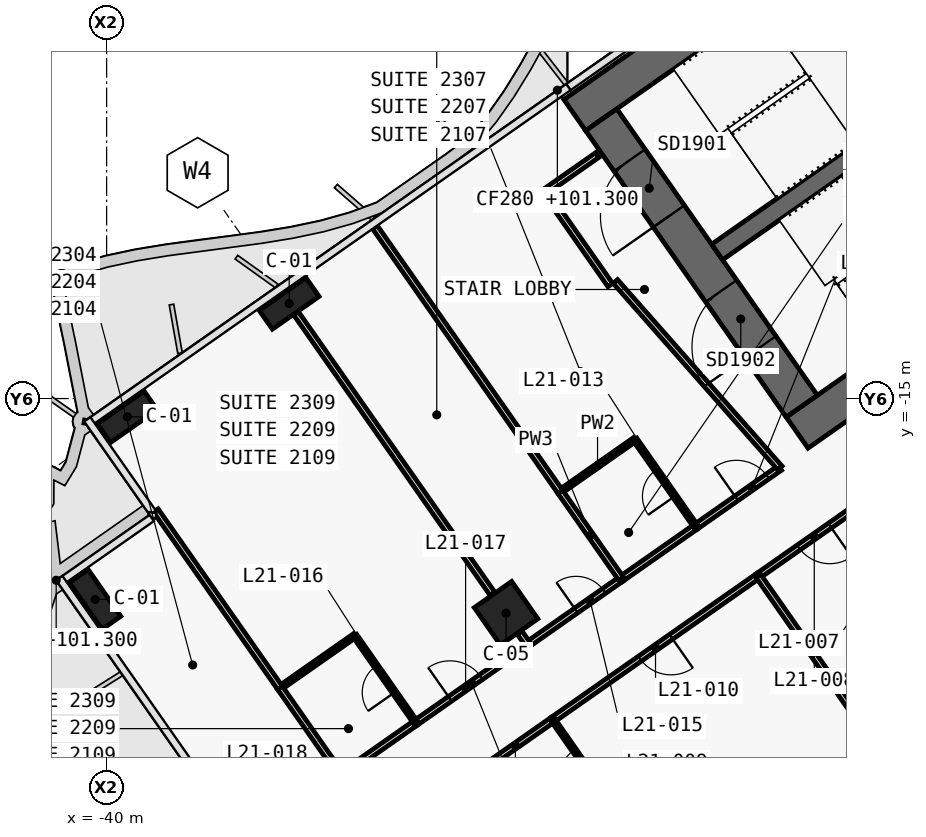
"""IFC4 building model, lengths in metres.
Left out: names, types, materials, properties, quantities, classifications, styles, units other than length and angle.
Written with IfcOpenShell. Run it as: python <this file> out.ifc"""

import sys

from ifc_helpers import new_model, si_unit, direction, frame, frame_2d, origin, origin_2d, place, context, subcontext, project, spatial, polyline, rectangle, outline, extrude, element, fill, save


model = new_model("IFC4")
c1 = context("Model", 3, precision=1e-05, world=origin(), true_north=direction((0.0, 1.0)))
c2 = subcontext(c1, "Body", "Model", "MODEL_VIEW")
j1 = project(units=[si_unit("LENGTHUNIT", "METRE"), si_unit("PLANEANGLEUNIT", "RADIAN")], contexts=[c1])
p1 = place(None, origin())
s1 = spatial("IfcSite", under=j1, at=p1, CompositionType="ELEMENT")
p2 = place(p1, origin())
s2 = spatial("IfcBuilding", under=s1, at=p2, CompositionType="ELEMENT")
p3 = place(p2, frame((0.0, 0.0, 101.3)))
s3 = spatial("IfcBuildingStorey", under=s2, at=p3, CompositionType="ELEMENT", Elevation=101.3)
p4 = place(p3, frame((0.037, 11.867, 0.0), z_axis=(0.0, 0.0, 1.0), x_axis=(-0.819155306259, -0.573571777746, 0.0)))
e1 = element("IfcWall", 1, at=p4, inside=s3, PredefinedType="SHEAR", context=c2, shape_type="SweptSolid", body=[
    extrude(outline(polyline([(33.837, 0.5), (0.7, 0.5), (0.0, -0.5), (33.837, -0.5), (33.837, 0.5)])), origin(), (0.0, 0.0, 1.0), 3.6),
])
p5 = place(p3, frame((0.037, -0.585, 0.0), z_axis=(0.0, 0.0, 1.0), x_axis=(-0.819157152511, -0.573569140985, 0.0)))
e2 = element("IfcWall", 2, at=p5, inside=s3, PredefinedType="SHEAR", context=c2, shape_type="SweptSolid", body=[
    extrude(outline(polyline([(26.695, 0.5), (0.7, 0.5), (0.0, -0.5), (26.695, -0.5), (26.695, 0.5)])), origin(), (0.0, 0.0, 1.0), 3.6),
])
p6 = place(p5, frame((2.995, 0.0, 0.0)))
e3 = element("IfcOpeningElement", 3, at=p6, cuts=e2, PredefinedType="OPENING", context=c2, shape_type="SweptSolid", body=[
    extrude(rectangle(XDim=2.4, YDim=2.1, at=frame_2d((1.2, 1.05))), frame((0.0, 0.51, 0.0), z_axis=(0.0, -1.0, 0.0), x_axis=(1.0, 0.0, 0.0)), (0.0, 0.0, 1.0), 1.02),
])
p7 = place(p5, frame((11.995, 0.0, 0.0)))
e4 = element("IfcOpeningElement", 4, at=p7, cuts=e2, PredefinedType="OPENING", context=c2, shape_type="SweptSolid", body=[
    extrude(rectangle(XDim=2.4, YDim=2.1, at=frame_2d((1.2, 1.05))), frame((0.0, 0.51, 0.0), z_axis=(0.0, -1.0, 0.0), x_axis=(1.0, 0.0, 0.0)), (0.0, 0.0, 1.0), 1.02),
])
p8 = place(p3, frame((-21.708, -15.2, 0.0), z_axis=(0.0, 0.0, 1.0), x_axis=(-0.573576324356, 0.819152122709, 0.0)))
e5 = element("IfcWall", 5, at=p8, inside=s3, PredefinedType="SHEAR", context=c2, shape_type="SweptSolid", body=[
    extrude(outline(polyline([(0.0, 0.5), (0.0, -0.5), (9.2, -0.5), (9.2, 0.5), (0.0, 0.5)])), origin(), (0.0, 0.0, 1.0), 3.6),
])
p9 = place(p8, frame((6.1, 0.0, 0.0)))
e6 = element("IfcOpeningElement", 6, at=p9, cuts=e5, PredefinedType="OPENING", context=c2, shape_type="SweptSolid", body=[
    extrude(rectangle(XDim=1.8, YDim=2.1, at=frame_2d((0.9, 1.05))), frame((0.0, 0.51, 0.0), z_axis=(0.0, -1.0, 0.0), x_axis=(1.0, 0.0, 0.0)), (0.0, 0.0, 1.0), 1.02),
])
p10 = place(p8, frame((1.9, 0.0, 0.0)))
e7 = element("IfcOpeningElement", 7, at=p10, cuts=e5, PredefinedType="OPENING", context=c2, shape_type="SweptSolid", body=[
    extrude(rectangle(XDim=1.8, YDim=2.1, at=frame_2d((0.9, 1.05))), frame((0.0, 0.51, 0.0), z_axis=(0.0, -1.0, 0.0), x_axis=(1.0, 0.0, 0.0)), (0.0, 0.0, 1.0), 1.02),
])
p11 = place(p3, frame((-2.638, 3.768, 0.0), z_axis=(0.0, 0.0, 1.0), x_axis=(-0.819148977158, -0.573580816643, 0.0)))
e8 = element("IfcWall", 8, at=p11, inside=s3, PredefinedType="SHEAR", context=c2, shape_type="SweptSolid", body=[
    extrude(outline(polyline([(26.0, 0.25), (0.0, 0.25), (0.0, -0.25), (26.0, -0.25), (26.0, 0.25)])), origin(), (0.0, 0.0, 1.0), 3.6),
])
p12 = place(p11, frame((1.169, 0.0, 0.0)))
e9 = element("IfcOpeningElement", 9, at=p12, cuts=e8, PredefinedType="OPENING", context=c2, shape_type="SweptSolid", body=[
    extrude(rectangle(XDim=1.1, YDim=2.1, at=frame_2d((0.55, 1.05))), frame((0.0, 0.26, 0.0), z_axis=(0.0, -1.0, 0.0), x_axis=(1.0, 0.0, 0.0)), (0.0, 0.0, 1.0), 0.52),
])
p13 = place(p11, frame((3.206, 0.0, 0.0)))
e10 = element("IfcOpeningElement", 10, at=p13, cuts=e8, PredefinedType="OPENING", context=c2, shape_type="SweptSolid", body=[
    extrude(rectangle(XDim=1.1, YDim=2.1, at=frame_2d((0.55, 1.05))), frame((0.0, 0.26, 0.0), z_axis=(0.0, -1.0, 0.0), x_axis=(1.0, 0.0, 0.0)), (0.0, 0.0, 1.0), 0.52),
])
p14 = place(p11, frame((5.244, 0.0, 0.0)))
e11 = element("IfcOpeningElement", 11, at=p14, cuts=e8, PredefinedType="OPENING", context=c2, shape_type="SweptSolid", body=[
    extrude(rectangle(XDim=1.1, YDim=2.1, at=frame_2d((0.55, 1.05))), frame((0.0, 0.26, 0.0), z_axis=(0.0, -1.0, 0.0), x_axis=(1.0, 0.0, 0.0)), (0.0, 0.0, 1.0), 0.52),
])
p15 = place(p11, frame((7.281, 0.0, 0.0)))
e12 = element("IfcOpeningElement", 12, at=p15, cuts=e8, PredefinedType="OPENING", context=c2, shape_type="SweptSolid", body=[
    extrude(rectangle(XDim=1.1, YDim=2.1, at=frame_2d((0.55, 1.05))), frame((0.0, 0.26, 0.0), z_axis=(0.0, -1.0, 0.0), x_axis=(1.0, 0.0, 0.0)), (0.0, 0.0, 1.0), 0.52),
])
p16 = place(p11, frame((9.688, 0.0, 0.0)))
e13 = element("IfcOpeningElement", 13, at=p16, cuts=e8, PredefinedType="OPENING", context=c2, shape_type="SweptSolid", body=[
    extrude(rectangle(XDim=1.1, YDim=2.1, at=frame_2d((0.55, 1.05))), frame((0.0, 0.26, 0.0), z_axis=(0.0, -1.0, 0.0), x_axis=(1.0, 0.0, 0.0)), (0.0, 0.0, 1.0), 0.52),
])
p17 = place(p11, frame((11.863, 0.0, 0.0)))
e14 = element("IfcOpeningElement", 14, at=p17, cuts=e8, PredefinedType="OPENING", context=c2, shape_type="SweptSolid", body=[
    extrude(rectangle(XDim=1.1, YDim=2.1, at=frame_2d((0.55, 1.05))), frame((0.0, 0.26, 0.0), z_axis=(0.0, -1.0, 0.0), x_axis=(1.0, 0.0, 0.0)), (0.0, 0.0, 1.0), 0.52),
])
p18 = place(p11, frame((14.038, 0.0, 0.0)))
e15 = element("IfcOpeningElement", 15, at=p18, cuts=e8, PredefinedType="OPENING", context=c2, shape_type="SweptSolid", body=[
    extrude(rectangle(XDim=1.1, YDim=2.1, at=frame_2d((0.55, 1.05))), frame((0.0, 0.26, 0.0), z_axis=(0.0, -1.0, 0.0), x_axis=(1.0, 0.0, 0.0)), (0.0, 0.0, 1.0), 0.52),
])
p19 = place(p11, frame((16.212, 0.0, 0.0)))
e16 = element("IfcOpeningElement", 16, at=p19, cuts=e8, PredefinedType="OPENING", context=c2, shape_type="SweptSolid", body=[
    extrude(rectangle(XDim=1.1, YDim=2.1, at=frame_2d((0.55, 1.05))), frame((0.0, 0.26, 0.0), z_axis=(0.0, -1.0, 0.0), x_axis=(1.0, 0.0, 0.0)), (0.0, 0.0, 1.0), 0.52),
])
for number, where, z_axis, x_axis in (
    (17, (-35.197, -12.498, 0.0), (0.0, 0.0, 1.0), (-0.819, -0.574, 0.0)),
    (18, (-39.456, -15.481, 0.0), (0.0, 0.0, 1.0), (-0.819, -0.574, 0.0)),
    (19, (-40.303, -20.286, 0.0), (0.0, 0.0, 1.0), (-0.574, 0.819, 0.0)),
):
    element("IfcColumn", number, at=place(p3, frame(where, z_axis=z_axis, x_axis=x_axis)), inside=s3, PredefinedType="COLUMN", context=c2, shape_type="SweptSolid", body=[
        extrude(rectangle(XDim=1.5, YDim=0.6, at=origin_2d()), origin(), (0.0, 0.0, 1.0), 3.6),
    ])
p20 = place(p3, frame((-29.49, -20.649, 0.0), z_axis=(0.0, 0.0, 1.0), x_axis=(-0.819152044289, -0.573576436351, 0.0)))
e20 = element("IfcColumn", 20, at=p20, inside=s3, PredefinedType="COLUMN", context=c2, shape_type="SweptSolid", body=[
    extrude(rectangle(XDim=1.2, YDim=1.2, at=origin_2d()), origin(), (0.0, 0.0, 1.0), 3.6),
])
p21 = place(p3, frame((-24.493, -18.371, 0.0), z_axis=(0.0, 0.0, 1.0), x_axis=(0.819176640776, 0.573541307325, 0.0)))
e21 = element("IfcWall", 21, at=p21, inside=s3, PredefinedType="PARTITIONING", context=c2, shape_type="SweptSolid", body=[
    extrude(rectangle(XDim=2.698, YDim=0.15, at=frame_2d((1.349, 0.0))), origin(), (0.0, 0.0, 1.0), 3.32),
])
p22 = place(p21, frame((1.301, 0.0, 0.0)))
e22 = element("IfcOpeningElement", 22, at=p22, cuts=e21, PredefinedType="OPENING", context=c2, shape_type="SweptSolid", body=[
    extrude(rectangle(XDim=1.0, YDim=2.1, at=frame_2d((0.5, 1.05))), frame((0.0, 0.085, 0.0), z_axis=(0.0, -1.0, 0.0), x_axis=(1.0, 0.0, 0.0)), (0.0, 0.0, 1.0), 0.17),
])
p23 = place(p3, frame((-26.46, -19.748, 0.0), z_axis=(0.0, 0.0, 1.0), x_axis=(0.819179439794, 0.573537309527, 0.0)))
e23 = element("IfcWall", 23, at=p23, inside=s3, PredefinedType="PARTITIONING", context=c2, shape_type="SweptSolid", body=[
    extrude(rectangle(XDim=2.404, YDim=0.15, at=frame_2d((1.202, 0.0))), origin(), (0.0, 0.0, 1.0), 3.32),
])
p24 = place(p3, frame((-28.917, -21.469, 0.0), z_axis=(0.0, 0.0, 1.0), x_axis=(0.81916700466, 0.573555070134, 0.0)))
e24 = element("IfcWall", 24, at=p24, inside=s3, PredefinedType="PARTITIONING", context=c2, shape_type="SweptSolid", body=[
    extrude(rectangle(XDim=3.004, YDim=0.15, at=frame_2d((1.502, 0.0))), origin(), (0.0, 0.0, 1.0), 2.6),
])
p25 = place(p24, frame((1.552, 0.0, 0.0)))
e25 = element("IfcOpeningElement", 25, at=p25, cuts=e24, PredefinedType="OPENING", context=c2, shape_type="SweptSolid", body=[
    extrude(rectangle(XDim=0.9, YDim=2.1, at=frame_2d((0.45, 1.05))), frame((0.0, 0.085, 0.0), z_axis=(0.0, -1.0, 0.0), x_axis=(1.0, 0.0, 0.0)), (0.0, 0.0, 1.0), 0.17),
])
p26 = place(p3, frame((-31.866, -23.533, 0.0), z_axis=(0.0, 0.0, 1.0), x_axis=(0.819145961204, 0.573585123798, 0.0)))
e26 = element("IfcWall", 26, at=p26, inside=s3, PredefinedType="PARTITIONING", context=c2, shape_type="SweptSolid", body=[
    extrude(rectangle(XDim=3.603, YDim=0.15, at=frame_2d((1.802, 0.0))), origin(), (0.0, 0.0, 1.0), 2.6),
])
p27 = place(p26, frame((1.101, 0.0, 0.0)))
e27 = element("IfcOpeningElement", 27, at=p27, cuts=e26, PredefinedType="OPENING", context=c2, shape_type="SweptSolid", body=[
    extrude(rectangle(XDim=1.0, YDim=2.1, at=frame_2d((0.5, 1.05))), frame((0.0, 0.085, 0.0), z_axis=(0.0, -1.0, 0.0), x_axis=(1.0, 0.0, 0.0)), (0.0, 0.0, 1.0), 0.17),
])
p28 = place(p3, frame((-33.833, -24.91, 0.0), z_axis=(0.0, 0.0, 1.0), x_axis=(0.819146032251, 0.573585022335, 0.0)))
e28 = element("IfcWall", 28, at=p28, inside=s3, PredefinedType="PARTITIONING", context=c2, shape_type="SweptSolid", body=[
    extrude(rectangle(XDim=2.404, YDim=0.15, at=frame_2d((1.202, 0.0))), origin(), (0.0, 0.0, 1.0), 3.32),
])
p29 = place(p3, frame((-19.904, -17.599, 0.0), z_axis=(0.0, 0.0, 1.0), x_axis=(-0.819145961204, -0.573585123798, 0.0)))
e29 = element("IfcWall", 29, at=p29, inside=s3, PredefinedType="PARTITIONING", context=c2, shape_type="SweptSolid", body=[
    extrude(rectangle(XDim=3.603, YDim=0.15, at=frame_2d((1.802, 0.0))), origin(), (0.0, 0.0, 1.0), 2.6),
])
p30 = place(p29, frame((1.301, 0.0, 0.0)))
e30 = element("IfcOpeningElement", 30, at=p30, cuts=e29, PredefinedType="OPENING", context=c2, shape_type="SweptSolid", body=[
    extrude(rectangle(XDim=1.0, YDim=2.1, at=frame_2d((0.5, 1.05))), frame((0.0, 0.085, 0.0), z_axis=(0.0, -1.0, 0.0), x_axis=(1.0, 0.0, 0.0)), (0.0, 0.0, 1.0), 0.17),
])
p31 = place(p3, frame((-22.852, -19.664, 0.0), z_axis=(0.0, 0.0, 1.0), x_axis=(-0.819141582452, -0.573591377113, 0.0)))
e31 = element("IfcWall", 31, at=p31, inside=s3, PredefinedType="PARTITIONING", context=c2, shape_type="SweptSolid", body=[
    extrude(rectangle(XDim=6.603, YDim=0.15, at=frame_2d((3.301, 0.0))), origin(), (0.0, 0.0, 1.0), 2.6),
])
p32 = place(p31, frame((2.802, 0.0, 0.0)))
e32 = element("IfcOpeningElement", 32, at=p32, cuts=e31, PredefinedType="OPENING", context=c2, shape_type="SweptSolid", body=[
    extrude(rectangle(XDim=1.0, YDim=2.1, at=frame_2d((0.5, 1.05))), frame((0.0, 0.085, 0.0), z_axis=(0.0, -1.0, 0.0), x_axis=(1.0, 0.0, 0.0)), (0.0, 0.0, 1.0), 0.17),
])
p33 = place(p3, frame((-28.259, -23.449, 0.0), z_axis=(0.0, 0.0, 1.0), x_axis=(-0.819146032251, -0.573585022335, 0.0)))
e33 = element("IfcWall", 33, at=p33, inside=s3, PredefinedType="PARTITIONING", context=c2, shape_type="SweptSolid", body=[
    extrude(rectangle(XDim=2.404, YDim=0.15, at=frame_2d((1.202, 0.0))), origin(), (0.0, 0.0, 1.0), 3.32),
])
p34 = place(p3, frame((-26.746, -12.014, 0.0), z_axis=(0.0, 0.0, 1.0), x_axis=(-0.573560650686, 0.819163097304, 0.0)))
e34 = element("IfcWall", 34, at=p34, inside=s3, PredefinedType="PARTITIONING", context=c2, shape_type="SweptSolid", body=[
    extrude(rectangle(XDim=3.0, YDim=0.15, at=frame_2d((1.5, 0.0))), origin(), (0.0, 0.0, 1.0), 3.32),
])
p35 = place(p3, frame((-28.467, -9.556, 0.0), z_axis=(0.0, 0.0, 1.0), x_axis=(0.819109000826, 0.573637903879, 0.0)))
e35 = element("IfcWall", 35, at=p35, inside=s3, PredefinedType="PARTITIONING", context=c2, shape_type="SweptSolid", body=[
    extrude(rectangle(XDim=1.68, YDim=0.15, at=frame_2d((0.84, 0.0))), origin(), (0.0, 0.0, 1.0), 3.32),
])
p36 = place(p3, frame((-22.284, -16.827, 0.0), z_axis=(0.0, 0.0, 1.0), x_axis=(-0.661545117561, 0.749905365651, 0.0)))
e36 = element("IfcWall", 36, at=p36, inside=s3, PredefinedType="PARTITIONING", context=c2, shape_type="SweptSolid", body=[
    extrude(rectangle(XDim=6.543, YDim=0.15, at=frame_2d((3.271, 0.0))), origin(), (0.0, 0.0, 1.0), 2.6),
])
p37 = place(p3, frame((-26.099, -16.076, 0.0), z_axis=(0.0, 0.0, 1.0), x_axis=(-0.819155442668, -0.573571582932, 0.0)))
e37 = element("IfcWall", 37, at=p37, inside=s3, PredefinedType="PARTITIONING", context=c2, shape_type="SweptSolid", body=[
    extrude(rectangle(XDim=2.4, YDim=0.12, at=frame_2d((1.2, 0.0))), origin(), (0.0, 0.0, 1.0), 3.32),
])
p38 = place(p3, frame((-24.492, -18.37, 0.0), z_axis=(0.0, 0.0, 1.0), x_axis=(-0.573550118428, 0.819170471667, 0.0)))
e38 = element("IfcWall", 38, at=p38, inside=s3, PredefinedType="PARTITIONING", context=c2, shape_type="SweptSolid", body=[
    extrude(rectangle(XDim=2.8, YDim=0.12, at=frame_2d((1.4, 0.0))), origin(), (0.0, 0.0, 1.0), 2.6),
])
p39 = place(p38, frame((0.975, 0.0, 0.0)))
e39 = element("IfcOpeningElement", 39, at=p39, cuts=e38, PredefinedType="OPENING", context=c2, shape_type="SweptSolid", body=[
    extrude(rectangle(XDim=0.85, YDim=2.05, at=frame_2d((0.425, 1.025))), frame((0.0, 0.07, 0.0), z_axis=(0.0, -1.0, 0.0), x_axis=(1.0, 0.0, 0.0)), (0.0, 0.0, 1.0), 0.14),
])
p40 = place(p3, frame((-28.065, -17.453, 0.0), z_axis=(0.0, 0.0, 1.0), x_axis=(-0.573593433868, 0.819140142237, 0.0)))
e40 = element("IfcWall", 40, at=p40, inside=s3, PredefinedType="PARTITIONING", context=c2, shape_type="SweptSolid", body=[
    extrude(rectangle(XDim=8.499, YDim=0.15, at=frame_2d((4.25, 0.0))), origin(), (0.0, 0.0, 1.0), 2.6),
])
p41 = place(p3, frame((-26.458, -19.747, 0.0), z_axis=(0.0, 0.0, 1.0), x_axis=(-0.573550118428, 0.819170471667, 0.0)))
e41 = element("IfcWall", 41, at=p41, inside=s3, PredefinedType="PARTITIONING", context=c2, shape_type="SweptSolid", body=[
    extrude(rectangle(XDim=2.8, YDim=0.15, at=frame_2d((1.4, 0.0))), origin(), (0.0, 0.0, 1.0), 2.6),
])
p42 = place(p3, frame((-28.916, -21.468, 0.0), z_axis=(0.0, 0.0, 1.0), x_axis=(-0.572944929411, 0.819593867633, 0.0)))
e42 = element("IfcWall", 42, at=p42, inside=s3, PredefinedType="PARTITIONING", context=c2, shape_type="SweptSolid", body=[
    extrude(rectangle(XDim=0.38, YDim=0.15, at=frame_2d((0.19, 0.0))), origin(), (0.0, 0.0, 1.0), 2.6),
])
p43 = place(p3, frame((-29.845, -20.141, 0.0), z_axis=(0.0, 0.0, 1.0), x_axis=(-0.573558725113, 0.819164445546, 0.0)))
e43 = element("IfcWall", 43, at=p43, inside=s3, PredefinedType="PARTITIONING", context=c2, shape_type="SweptSolid", body=[
    extrude(rectangle(XDim=9.01, YDim=0.15, at=frame_2d((4.505, 0.0))), origin(), (0.0, 0.0, 1.0), 2.6),
])
p44 = place(p3, frame((-31.864, -23.532, 0.0), z_axis=(0.0, 0.0, 1.0), x_axis=(-0.573550118428, 0.819170471667, 0.0)))
e44 = element("IfcWall", 44, at=p44, inside=s3, PredefinedType="PARTITIONING", context=c2, shape_type="SweptSolid", body=[
    extrude(rectangle(XDim=2.8, YDim=0.12, at=frame_2d((1.4, 0.0))), origin(), (0.0, 0.0, 1.0), 2.6),
])
p45 = place(p44, frame((0.975, 0.0, 0.0)))
e45 = element("IfcOpeningElement", 45, at=p45, cuts=e44, PredefinedType="OPENING", context=c2, shape_type="SweptSolid", body=[
    extrude(rectangle(XDim=0.85, YDim=2.05, at=frame_2d((0.425, 1.025))), frame((0.0, 0.07, 0.0), z_axis=(0.0, -1.0, 0.0), x_axis=(1.0, 0.0, 0.0)), (0.0, 0.0, 1.0), 0.14),
])
p46 = place(p3, frame((-33.471, -21.238, 0.0), z_axis=(0.0, 0.0, 1.0), x_axis=(-0.819141114317, -0.573592045652, 0.0)))
e46 = element("IfcWall", 46, at=p46, inside=s3, PredefinedType="PARTITIONING", context=c2, shape_type="SweptSolid", body=[
    extrude(rectangle(XDim=2.4, YDim=0.12, at=frame_2d((1.2, 0.0))), origin(), (0.0, 0.0, 1.0), 3.32),
])
p47 = place(p3, frame((-35.438, -22.615, 0.0), z_axis=(0.0, 0.0, 1.0), x_axis=(-0.573568678046, 0.819157476658, 0.0)))
e47 = element("IfcWall", 47, at=p47, inside=s3, PredefinedType="PARTITIONING", context=c2, shape_type="SweptSolid", body=[
    extrude(rectangle(XDim=5.701, YDim=0.15, at=frame_2d((2.851, 0.0))), origin(), (0.0, 0.0, 1.0), 3.32),
])
p48 = place(p3, frame((-33.831, -24.909, 0.0), z_axis=(0.0, 0.0, 1.0), x_axis=(-0.573550118428, 0.819170471667, 0.0)))
e48 = element("IfcWall", 48, at=p48, inside=s3, PredefinedType="PARTITIONING", context=c2, shape_type="SweptSolid", body=[
    extrude(rectangle(XDim=2.8, YDim=0.15, at=frame_2d((1.4, 0.0))), origin(), (0.0, 0.0, 1.0), 2.6),
])
p49 = place(p3, frame((-18.667, -25.645, 0.0), z_axis=(0.0, 0.0, 1.0), x_axis=(-0.573572324301, 0.819154923562, 0.0)))
e49 = element("IfcWall", 49, at=p49, inside=s3, PredefinedType="PARTITIONING", context=c2, shape_type="SweptSolid", body=[
    extrude(rectangle(XDim=7.3, YDim=0.15, at=frame_2d((3.65, 0.0))), origin(), (0.0, 0.0, 1.0), 2.5),
])
p50 = place(p3, frame((-26.653, -25.743, 0.0), z_axis=(0.0, 0.0, 1.0), x_axis=(-0.573608623498, 0.819129505664, 0.0)))
e50 = element("IfcWall", 50, at=p50, inside=s3, PredefinedType="PARTITIONING", context=c2, shape_type="SweptSolid", body=[
    extrude(rectangle(XDim=2.8, YDim=0.12, at=frame_2d((1.4, 0.0))), origin(), (0.0, 0.0, 1.0), 3.32),
])
p51 = place(p50, frame((0.975, 0.0, 0.0)))
e51 = element("IfcOpeningElement", 51, at=p51, cuts=e50, PredefinedType="OPENING", context=c2, shape_type="SweptSolid", body=[
    extrude(rectangle(XDim=0.85, YDim=2.05, at=frame_2d((0.425, 1.025))), frame((0.0, 0.07, 0.0), z_axis=(0.0, -1.0, 0.0), x_axis=(1.0, 0.0, 0.0)), (0.0, 0.0, 1.0), 0.14),
])
p52 = place(p9, origin())
e52 = element("IfcDoor", 52, at=p52, inside=s3, OperationType="DOUBLE_DOOR_SINGLE_SWING", PredefinedType="DOOR", context=c2, shape_type="SweptSolid", body=[
    extrude(rectangle(XDim=1.8, YDim=2.1, at=frame_2d((0.9, 1.05))), frame((0.0, 0.025, 0.0), z_axis=(0.0, -1.0, 0.0), x_axis=(1.0, 0.0, 0.0)), (0.0, 0.0, 1.0), 0.05),
])
fill(e6, e52)
p53 = place(p10, origin())
e53 = element("IfcDoor", 53, at=p53, inside=s3, OperationType="DOUBLE_DOOR_SINGLE_SWING", PredefinedType="DOOR", context=c2, shape_type="SweptSolid", body=[
    extrude(rectangle(XDim=1.8, YDim=2.1, at=frame_2d((0.9, 1.05))), frame((0.0, 0.025, 0.0), z_axis=(0.0, -1.0, 0.0), x_axis=(1.0, 0.0, 0.0)), (0.0, 0.0, 1.0), 0.05),
])
fill(e7, e53)
p54 = place(p30, origin())
e54 = element("IfcDoor", 54, at=p54, inside=s3, OperationType="SINGLE_SWING_RIGHT", PredefinedType="DOOR", context=c2, shape_type="SweptSolid", body=[
    extrude(rectangle(XDim=1.0, YDim=2.1, at=frame_2d((0.5, 1.05))), frame((0.0, 0.025, 0.0), z_axis=(0.0, -1.0, 0.0), x_axis=(1.0, 0.0, 0.0)), (0.0, 0.0, 1.0), 0.05),
])
fill(e30, e54)
p55 = place(p51, origin())
e55 = element("IfcDoor", 55, at=p55, inside=s3, OperationType="SINGLE_SWING_LEFT", PredefinedType="DOOR", context=c2, shape_type="SweptSolid", body=[
    extrude(rectangle(XDim=0.85, YDim=2.05, at=frame_2d((0.425, 1.025))), frame((0.0, 0.025, 0.0), z_axis=(0.0, -1.0, 0.0), x_axis=(1.0, 0.0, 0.0)), (0.0, 0.0, 1.0), 0.05),
])
fill(e51, e55)
p56 = place(p32, origin())
e56 = element("IfcDoor", 56, at=p56, inside=s3, OperationType="SINGLE_SWING_LEFT", PredefinedType="DOOR", context=c2, shape_type="SweptSolid", body=[
    extrude(rectangle(XDim=1.0, YDim=2.1, at=frame_2d((0.5, 1.05))), frame((0.0, 0.025, 0.0), z_axis=(0.0, -1.0, 0.0), x_axis=(1.0, 0.0, 0.0)), (0.0, 0.0, 1.0), 0.05),
])
fill(e32, e56)
p57 = place(p39, origin())
e57 = element("IfcDoor", 57, at=p57, inside=s3, OperationType="SINGLE_SWING_LEFT", PredefinedType="DOOR", context=c2, shape_type="SweptSolid", body=[
    extrude(rectangle(XDim=0.85, YDim=2.05, at=frame_2d((0.425, 1.025))), frame((0.0, 0.025, 0.0), z_axis=(0.0, -1.0, 0.0), x_axis=(1.0, 0.0, 0.0)), (0.0, 0.0, 1.0), 0.05),
])
fill(e39, e57)
p58 = place(p22, origin())
e58 = element("IfcDoor", 58, at=p58, inside=s3, OperationType="SINGLE_SWING_RIGHT", PredefinedType="DOOR", context=c2, shape_type="SweptSolid", body=[
    extrude(rectangle(XDim=1.0, YDim=2.1, at=frame_2d((0.5, 1.05))), frame((0.0, 0.025, 0.0), z_axis=(0.0, -1.0, 0.0), x_axis=(1.0, 0.0, 0.0)), (0.0, 0.0, 1.0), 0.05),
])
fill(e22, e58)
p59 = place(p25, origin())
e59 = element("IfcDoor", 59, at=p59, inside=s3, OperationType="SINGLE_SWING_LEFT", PredefinedType="DOOR", context=c2, shape_type="SweptSolid", body=[
    extrude(rectangle(XDim=0.9, YDim=2.1, at=frame_2d((0.45, 1.05))), frame((0.0, 0.025, 0.0), z_axis=(0.0, -1.0, 0.0), x_axis=(1.0, 0.0, 0.0)), (0.0, 0.0, 1.0), 0.05),
])
fill(e25, e59)
p60 = place(p45, origin())
e60 = element("IfcDoor", 60, at=p60, inside=s3, OperationType="SINGLE_SWING_RIGHT", PredefinedType="DOOR", context=c2, shape_type="SweptSolid", body=[
    extrude(rectangle(XDim=0.85, YDim=2.05, at=frame_2d((0.425, 1.025))), frame((0.0, 0.025, 0.0), z_axis=(0.0, -1.0, 0.0), x_axis=(1.0, 0.0, 0.0)), (0.0, 0.0, 1.0), 0.05),
])
fill(e45, e60)
p61 = place(p27, origin())
e61 = element("IfcDoor", 61, at=p61, inside=s3, OperationType="SINGLE_SWING_LEFT", PredefinedType="DOOR", context=c2, shape_type="SweptSolid", body=[
    extrude(rectangle(XDim=1.0, YDim=2.1, at=frame_2d((0.5, 1.05))), frame((0.0, 0.025, 0.0), z_axis=(0.0, -1.0, 0.0), x_axis=(1.0, 0.0, 0.0)), (0.0, 0.0, 1.0), 0.05),
])
fill(e27, e61)
save(model, sys.argv[1])
